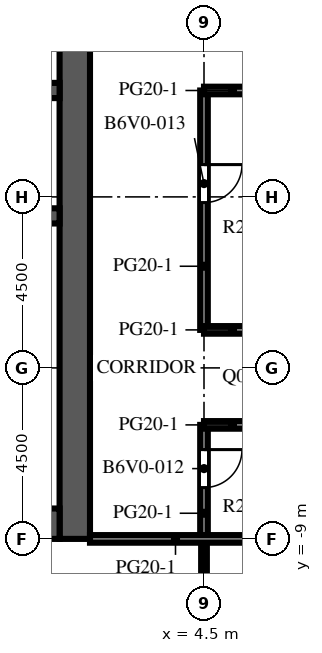
"""IFC4 building model, lengths in metres.
Left out: names, types, materials, properties, quantities, classifications, styles, units other than length and angle.
Written with IfcOpenShell. Run it as: python <this file> out.ifc"""

import sys

from ifc_helpers import new_model, si_unit, direction, frame, frame_2d, origin, place, context, subcontext, project, spatial, rectangle, extrude, element, fill, save


model = new_model("IFC4")
c1 = context("Model", 3, precision=1e-05, world=origin(), true_north=direction((0.0, 1.0)))
c2 = subcontext(c1, "Body", "Model", "MODEL_VIEW")
j1 = project(units=[si_unit("LENGTHUNIT", "METRE"), si_unit("PLANEANGLEUNIT", "RADIAN")], contexts=[c1])
p1 = place(None, origin())
s1 = spatial("IfcSite", under=j1, at=p1, CompositionType="ELEMENT")
p2 = place(p1, origin())
s2 = spatial("IfcBuilding", under=s1, at=p2, CompositionType="ELEMENT")
p3 = place(p2, frame((0.0, 0.0, 199.7)))
s3 = spatial("IfcBuildingStorey", under=s2, at=p3, CompositionType="ELEMENT", Elevation=199.7)
p4 = place(p3, frame((1.1, -9.0, 0.0), z_axis=(0.0, 0.0, 1.0), x_axis=(0.0, 1.0, 0.0)))
e1 = element("IfcWall", 1, at=p4, inside=s3, PredefinedType="SHEAR", context=c2, shape_type="SweptSolid", body=[
    extrude(rectangle(XDim=27.5, YDim=0.8, at=frame_2d((13.75, 0.0))), origin(), (0.0, 0.0, 1.0), 4.1),
])
p5 = place(p4, frame((12.55, 0.0, 0.0)))
e2 = element("IfcOpeningElement", 2, at=p5, cuts=e1, PredefinedType="OPENING", context=c2, shape_type="SweptSolid", body=[
    extrude(rectangle(XDim=2.4, YDim=2.4, at=frame_2d((1.2, 1.2))), frame((0.0, 0.41, 0.0), z_axis=(0.0, -1.0, 0.0), x_axis=(1.0, 0.0, 0.0)), (0.0, 0.0, 1.0), 0.82),
])
p6 = place(p4, frame((3.95, 0.0, 0.0)))
e3 = element("IfcOpeningElement", 3, at=p6, cuts=e1, PredefinedType="OPENING", context=c2, shape_type="SweptSolid", body=[
    extrude(rectangle(XDim=1.2, YDim=2.1, at=frame_2d((0.6, 1.05))), frame((0.0, 0.41, 0.0), z_axis=(0.0, -1.0, 0.0), x_axis=(1.0, 0.0, 0.0)), (0.0, 0.0, 1.0), 0.82),
])
p7 = place(p4, frame((19.45, 0.0, 0.0)))
e4 = element("IfcOpeningElement", 4, at=p7, cuts=e1, PredefinedType="OPENING", context=c2, shape_type="SweptSolid", body=[
    extrude(rectangle(XDim=1.0, YDim=2.1, at=frame_2d((0.5, 1.05))), frame((0.0, 0.41, 0.0), z_axis=(0.0, -1.0, 0.0), x_axis=(1.0, 0.0, 0.0)), (0.0, 0.0, 1.0), 0.82),
])
p8 = place(p4, frame((21.137, 0.0, 0.0)))
e5 = element("IfcOpeningElement", 5, at=p8, cuts=e1, PredefinedType="OPENING", context=c2, shape_type="SweptSolid", body=[
    extrude(rectangle(XDim=1.0, YDim=2.1, at=frame_2d((0.5, 1.05))), frame((0.0, 0.41, 0.0), z_axis=(0.0, -1.0, 0.0), x_axis=(1.0, 0.0, 0.0)), (0.0, 0.0, 1.0), 0.82),
])
p9 = place(p4, frame((23.2, 0.0, 0.0)))
e6 = element("IfcOpeningElement", 6, at=p9, cuts=e1, PredefinedType="OPENING", context=c2, shape_type="SweptSolid", body=[
    extrude(rectangle(XDim=1.0, YDim=2.1, at=frame_2d((0.5, 1.05))), frame((0.0, 0.41, 0.0), z_axis=(0.0, -1.0, 0.0), x_axis=(1.0, 0.0, 0.0)), (0.0, 0.0, 1.0), 0.82),
])
p10 = place(p4, frame((25.262, 0.0, 0.0)))
e7 = element("IfcOpeningElement", 7, at=p10, cuts=e1, PredefinedType="OPENING", context=c2, shape_type="SweptSolid", body=[
    extrude(rectangle(XDim=1.0, YDim=2.1, at=frame_2d((0.5, 1.05))), frame((0.0, 0.41, 0.0), z_axis=(0.0, -1.0, 0.0), x_axis=(1.0, 0.0, 0.0)), (0.0, 0.0, 1.0), 0.82),
])
p11 = place(p3, frame((-9.7, -8.6, 0.0), z_axis=(0.0, 0.0, 1.0), x_axis=(1.0, 0.0, 0.0)))
e8 = element("IfcWall", 8, at=p11, inside=s3, PredefinedType="SHEAR", context=c2, shape_type="SweptSolid", body=[
    extrude(rectangle(XDim=10.4, YDim=0.8, at=frame_2d((5.2, 0.0))), origin(), (0.0, 0.0, 1.0), 4.1),
])
p12 = place(p3, frame((-9.7, -0.5, 0.0), z_axis=(0.0, 0.0, 1.0), x_axis=(1.0, 0.0, 0.0)))
e9 = element("IfcWall", 9, at=p12, inside=s3, PredefinedType="SHEAR", context=c2, shape_type="SweptSolid", body=[
    extrude(rectangle(XDim=10.4, YDim=0.4, at=frame_2d((5.2, 0.0))), origin(), (0.0, 0.0, 1.0), 4.1),
])
p13 = place(p3, frame((-9.7, 2.8, 0.0), z_axis=(0.0, 0.0, 1.0), x_axis=(1.0, 0.0, 0.0)))
e10 = element("IfcWall", 10, at=p13, inside=s3, PredefinedType="SHEAR", context=c2, shape_type="SweptSolid", body=[
    extrude(rectangle(XDim=10.4, YDim=0.4, at=frame_2d((5.2, 0.0))), origin(), (0.0, 0.0, 1.0), 4.1),
])
p14 = place(p13, frame((0.738, 0.0, 0.0)))
e11 = element("IfcOpeningElement", 11, at=p14, cuts=e10, PredefinedType="OPENING", context=c2, shape_type="SweptSolid", body=[
    extrude(rectangle(XDim=1.1, YDim=2.1, at=frame_2d((0.55, 1.05))), frame((0.0, 0.21, 0.0), z_axis=(0.0, -1.0, 0.0), x_axis=(1.0, 0.0, 0.0)), (0.0, 0.0, 1.0), 0.42),
])
p15 = place(p13, frame((3.337, 0.0, 0.0)))
e12 = element("IfcOpeningElement", 12, at=p15, cuts=e10, PredefinedType="OPENING", context=c2, shape_type="SweptSolid", body=[
    extrude(rectangle(XDim=1.1, YDim=2.1, at=frame_2d((0.55, 1.05))), frame((0.0, 0.21, 0.0), z_axis=(0.0, -1.0, 0.0), x_axis=(1.0, 0.0, 0.0)), (0.0, 0.0, 1.0), 0.42),
])
p16 = place(p13, frame((6.012, 0.0, 0.0)))
e13 = element("IfcOpeningElement", 13, at=p16, cuts=e10, PredefinedType="OPENING", context=c2, shape_type="SweptSolid", body=[
    extrude(rectangle(XDim=1.0, YDim=2.1, at=frame_2d((0.5, 1.05))), frame((0.0, 0.21, 0.0), z_axis=(0.0, -1.0, 0.0), x_axis=(1.0, 0.0, 0.0)), (0.0, 0.0, 1.0), 0.42),
])
p17 = place(p13, frame((8.613, 0.0, 0.0)))
e14 = element("IfcOpeningElement", 14, at=p17, cuts=e10, PredefinedType="OPENING", context=c2, shape_type="SweptSolid", body=[
    extrude(rectangle(XDim=1.0, YDim=2.1, at=frame_2d((0.5, 1.05))), frame((0.0, 0.21, 0.0), z_axis=(0.0, -1.0, 0.0), x_axis=(1.0, 0.0, 0.0)), (0.0, 0.0, 1.0), 0.42),
])
p18 = place(p3, frame((-0.9, -5.95, 0.0), z_axis=(0.0, 0.0, 1.0), x_axis=(1.0, 0.0, 0.0)))
e15 = element("IfcWall", 15, at=p18, inside=s3, PredefinedType="PARTITIONING", context=c2, shape_type="SweptSolid", body=[
    extrude(rectangle(XDim=1.6, YDim=0.1, at=frame_2d((0.8, 0.0))), origin(), (0.0, 0.0, 1.0), 3.65),
])
p19 = place(p18, frame((0.3, 0.0, 0.0)))
e16 = element("IfcOpeningElement", 16, at=p19, cuts=e15, PredefinedType="OPENING", context=c2, shape_type="SweptSolid", body=[
    extrude(rectangle(XDim=1.0, YDim=2.1, at=frame_2d((0.5, 1.05))), frame((0.0, 0.06, 0.0), z_axis=(0.0, -1.0, 0.0), x_axis=(1.0, 0.0, 0.0)), (0.0, 0.0, 1.0), 0.12),
])
p20 = place(p3, frame((-0.9, -2.95, 0.0), z_axis=(0.0, 0.0, 1.0), x_axis=(1.0, 0.0, 0.0)))
e17 = element("IfcWall", 17, at=p20, inside=s3, PredefinedType="PARTITIONING", context=c2, shape_type="SweptSolid", body=[
    extrude(rectangle(XDim=1.6, YDim=0.1, at=frame_2d((0.8, 0.0))), origin(), (0.0, 0.0, 1.0), 3.65),
])
p21 = place(p20, frame((0.3, 0.0, 0.0)))
e18 = element("IfcOpeningElement", 18, at=p21, cuts=e17, PredefinedType="OPENING", context=c2, shape_type="SweptSolid", body=[
    extrude(rectangle(XDim=1.0, YDim=2.1, at=frame_2d((0.5, 1.05))), frame((0.0, 0.06, 0.0), z_axis=(0.0, -1.0, 0.0), x_axis=(1.0, 0.0, 0.0)), (0.0, 0.0, 1.0), 0.12),
])
p22 = place(p3, frame((4.5, -9.0, 0.0), z_axis=(0.0, 0.0, 1.0), x_axis=(0.0, -1.0, 0.0)))
e19 = element("IfcWall", 19, at=p22, inside=s3, PredefinedType="PARTITIONING", context=c2, shape_type="SweptSolid", body=[
    extrude(rectangle(XDim=17.5, YDim=0.15, at=frame_2d((8.75, 0.0))), origin(), (0.0, 0.0, 1.0), 3.65),
])
p23 = place(p22, frame((3.4, 0.0, 0.0)))
e20 = element("IfcOpeningElement", 20, at=p23, cuts=e19, PredefinedType="OPENING", context=c2, shape_type="SweptSolid", body=[
    extrude(rectangle(XDim=1.0, YDim=2.1, at=frame_2d((0.5, 1.05))), frame((0.0, 0.085, 0.0), z_axis=(0.0, -1.0, 0.0), x_axis=(1.0, 0.0, 0.0)), (0.0, 0.0, 1.0), 0.17),
])
p24 = place(p3, frame((4.5, -6.0, 0.0), z_axis=(0.0, 0.0, 1.0), x_axis=(0.0, -1.0, 0.0)))
e21 = element("IfcWall", 21, at=p24, inside=s3, PredefinedType="PARTITIONING", context=c2, shape_type="SweptSolid", body=[
    extrude(rectangle(XDim=3.0, YDim=0.2, at=frame_2d((1.5, 0.0))), origin(), (0.0, 0.0, 1.0), 3.65),
])
p25 = place(p24, frame((0.65, 0.0, 0.0)))
e22 = element("IfcOpeningElement", 22, at=p25, cuts=e21, PredefinedType="OPENING", context=c2, shape_type="SweptSolid", body=[
    extrude(rectangle(XDim=1.0, YDim=2.1, at=frame_2d((0.5, 1.05))), frame((0.0, 0.11, 0.0), z_axis=(0.0, -1.0, 0.0), x_axis=(1.0, 0.0, 0.0)), (0.0, 0.0, 1.0), 0.22),
])
p26 = place(p3, frame((4.5, 2.8, 0.0), z_axis=(0.0, 0.0, 1.0), x_axis=(0.0, -1.0, 0.0)))
e23 = element("IfcWall", 23, at=p26, inside=s3, PredefinedType="PARTITIONING", context=c2, shape_type="SweptSolid", body=[
    extrude(rectangle(XDim=6.3, YDim=0.2, at=frame_2d((3.15, 0.0))), origin(), (0.0, 0.0, 1.0), 3.65),
])
p27 = place(p26, frame((1.95, 0.0, 0.0)))
e24 = element("IfcOpeningElement", 24, at=p27, cuts=e23, PredefinedType="OPENING", context=c2, shape_type="SweptSolid", body=[
    extrude(rectangle(XDim=1.0, YDim=2.1, at=frame_2d((0.5, 1.05))), frame((0.0, 0.11, 0.0), z_axis=(0.0, -1.0, 0.0), x_axis=(1.0, 0.0, 0.0)), (0.0, 0.0, 1.0), 0.22),
])
p28 = place(p3, frame((1.5, -9.0, 0.0), z_axis=(0.0, 0.0, 1.0), x_axis=(1.0, 0.0, 0.0)))
e25 = element("IfcWall", 25, at=p28, inside=s3, PredefinedType="PARTITIONING", context=c2, shape_type="SweptSolid", body=[
    extrude(rectangle(XDim=4.5, YDim=0.2, at=frame_2d((2.25, 0.0))), origin(), (0.0, 0.0, 1.0), 3.65),
])
for number, where, z_axis, x_axis in (
    (26, (4.5, -6.0, 0.0), (0.0, 0.0, 1.0), (1.0, 0.0, 0.0)),
    (27, (4.5, -3.5, 0.0), (0.0, 0.0, 1.0), (1.0, 0.0, 0.0)),
    (28, (4.5, 2.8, 0.0), (0.0, 0.0, 1.0), (1.0, 0.0, 0.0)),
):
    element("IfcWall", number, at=place(p3, frame(where, z_axis=z_axis, x_axis=x_axis)), inside=s3, PredefinedType="PARTITIONING", context=c2, shape_type="SweptSolid", body=[
        extrude(rectangle(XDim=1.5, YDim=0.2, at=frame_2d((0.75, 0.0))), origin(), (0.0, 0.0, 1.0), 3.65),
    ])
p29 = place(p5, origin())
e29 = element("IfcDoor", 29, at=p29, inside=s3, OperationType="DOUBLE_DOOR_DOUBLE_SWING", PredefinedType="DOOR", context=c2, shape_type="SweptSolid", body=[
    extrude(rectangle(XDim=2.4, YDim=2.4, at=frame_2d((1.2, 1.2))), frame((0.0, 0.025, 0.0), z_axis=(0.0, -1.0, 0.0), x_axis=(1.0, 0.0, 0.0)), (0.0, 0.0, 1.0), 0.05),
])
fill(e2, e29)
p30 = place(p6, origin())
e30 = element("IfcDoor", 30, at=p30, inside=s3, OperationType="SINGLE_SWING_LEFT", PredefinedType="DOOR", context=c2, shape_type="SweptSolid", body=[
    extrude(rectangle(XDim=1.2, YDim=2.1, at=frame_2d((0.6, 1.05))), frame((0.0, 0.375, 0.0), z_axis=(0.0, -1.0, 0.0), x_axis=(1.0, 0.0, 0.0)), (0.0, 0.0, 1.0), 0.05),
])
fill(e3, e30)
p31 = place(p25, origin())
e31 = element("IfcDoor", 31, at=p31, inside=s3, OperationType="SINGLE_SWING_LEFT", PredefinedType="DOOR", context=c2, shape_type="SweptSolid", body=[
    extrude(rectangle(XDim=1.0, YDim=2.1, at=frame_2d((0.5, 1.05))), frame((0.0, 0.025, 0.0), z_axis=(0.0, -1.0, 0.0), x_axis=(1.0, 0.0, 0.0)), (0.0, 0.0, 1.0), 0.05),
])
fill(e22, e31)
p32 = place(p27, origin())
e32 = element("IfcDoor", 32, at=p32, inside=s3, OperationType="SINGLE_SWING_LEFT", PredefinedType="DOOR", context=c2, shape_type="SweptSolid", body=[
    extrude(rectangle(XDim=1.0, YDim=2.1, at=frame_2d((0.5, 1.05))), frame((0.0, 0.025, 0.0), z_axis=(0.0, -1.0, 0.0), x_axis=(1.0, 0.0, 0.0)), (0.0, 0.0, 1.0), 0.05),
])
fill(e24, e32)
save(model, sys.argv[1])
